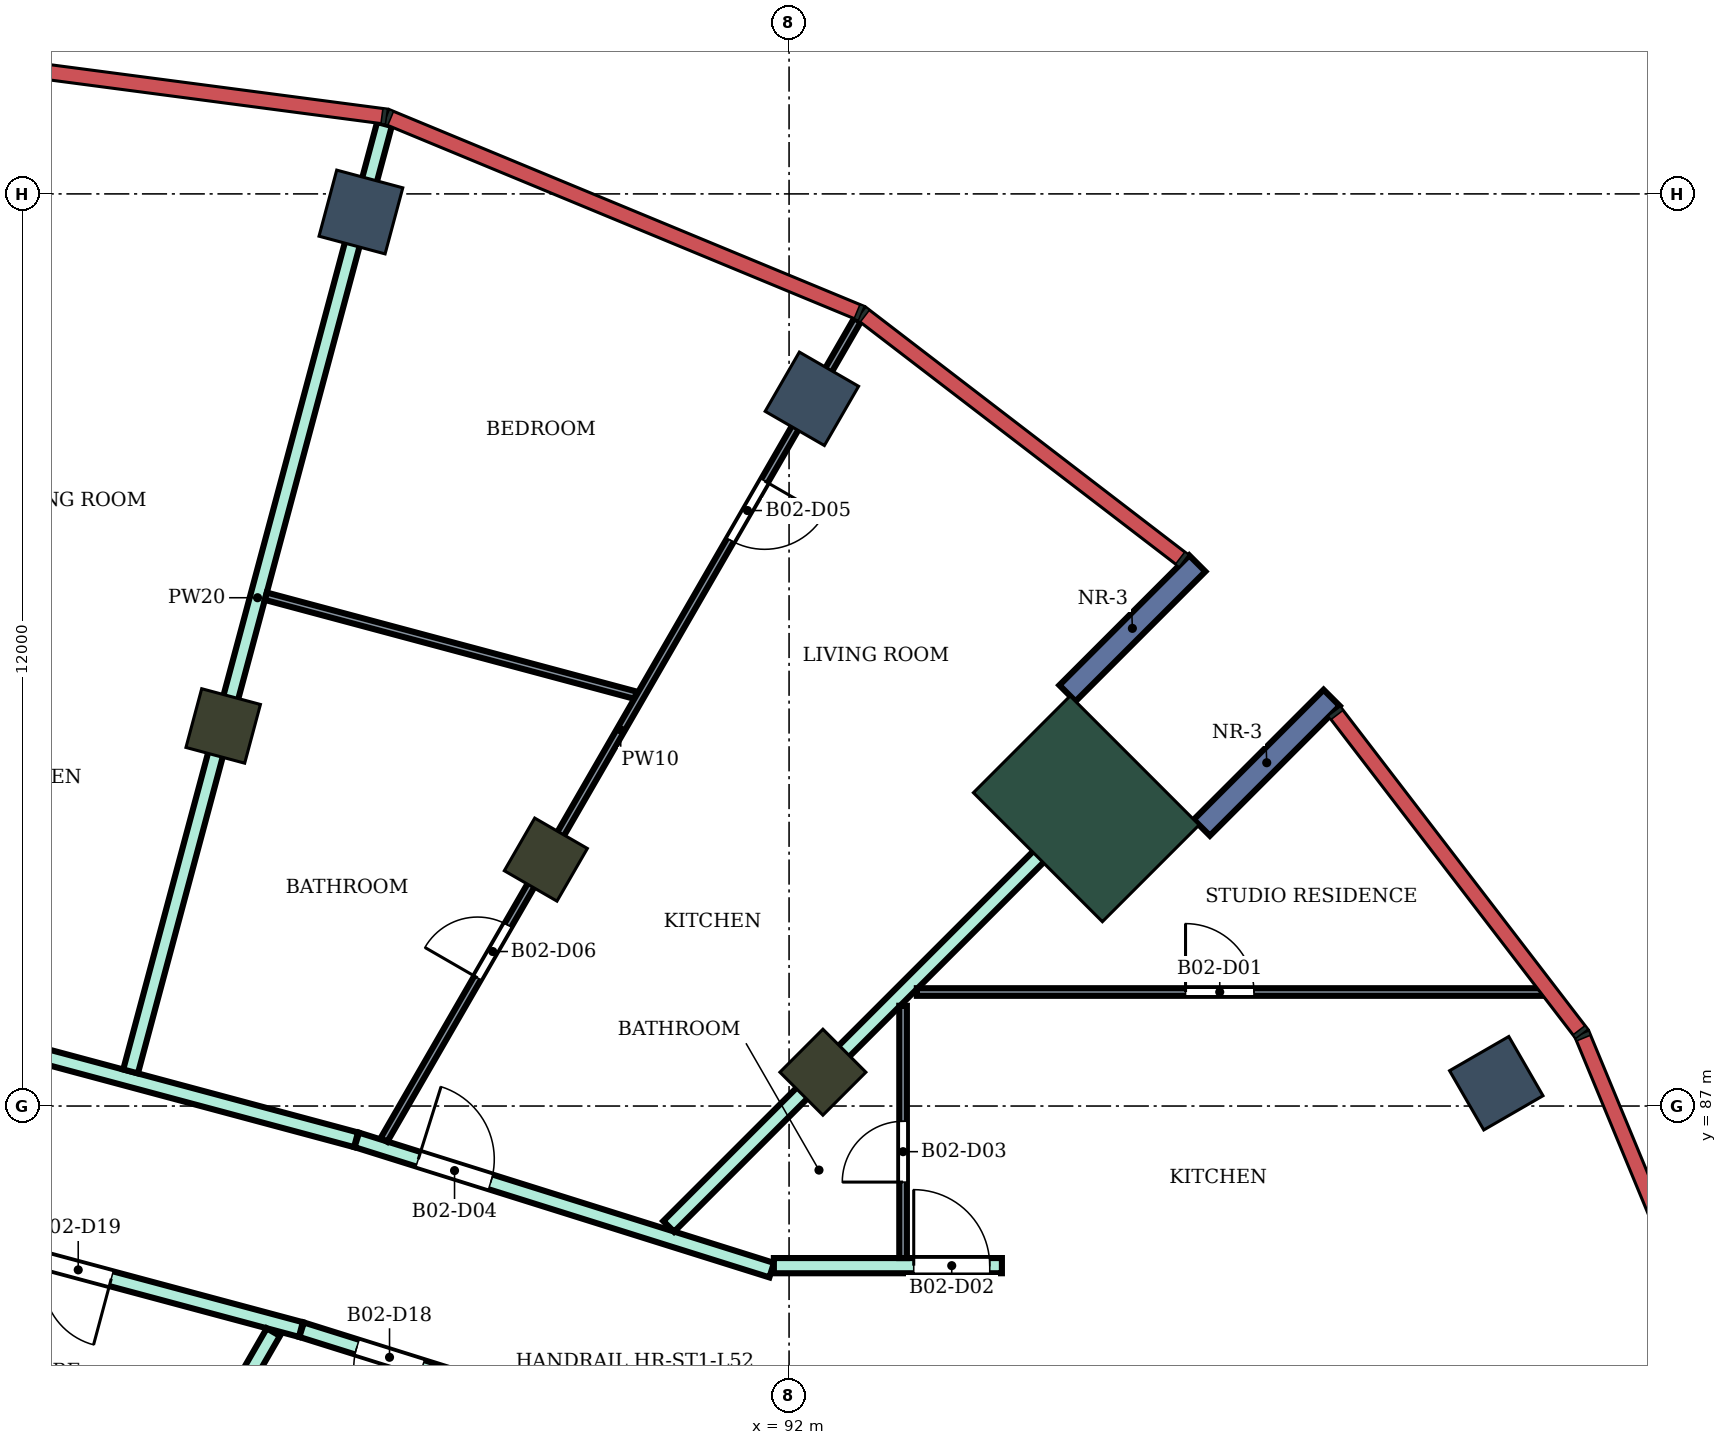
"""IFC4 building model, lengths in metres.
Left out: names, types, materials, properties, quantities, classifications, styles, units other than length and angle.
Written with IfcOpenShell. Run it as: python <this file> out.ifc"""

import sys

from ifc_helpers import new_model, si_unit, direction, frame, frame_2d, origin, origin_2d, place, context, subcontext, project, spatial, rectangle, extrude, element, fill, save


model = new_model("IFC4")
c1 = context("Model", 3, precision=1e-05, world=origin(), true_north=direction((0.0, 1.0)))
c2 = subcontext(c1, "Body", "Model", "MODEL_VIEW")
j1 = project(units=[si_unit("LENGTHUNIT", "METRE"), si_unit("PLANEANGLEUNIT", "RADIAN")], contexts=[c1])
p1 = place(None, origin())
s1 = spatial("IfcSite", under=j1, at=p1, CompositionType="ELEMENT")
p2 = place(p1, origin())
s2 = spatial("IfcBuilding", under=s1, at=p2, CompositionType="ELEMENT")
p3 = place(p2, frame((0.0, 0.0, 225.1)))
s3 = spatial("IfcBuildingStorey", under=s2, at=p3, CompositionType="ELEMENT", Elevation=225.1)
for number, where, z_axis, x_axis in (
    (1, (101.304, 87.3, 0.0), (0.0, 0.0, 1.0), (0.866, 0.5, 0.0)),
    (2, (92.3, 96.304, 0.0), (0.0, 0.0, 1.0), (0.5, 0.866, 0.0)),
    (3, (86.367, 98.762, 0.0), (0.0, 0.0, 1.0), (0.259, 0.966, 0.0)),
):
    element("IfcColumn", number, at=place(p3, frame(where, z_axis=z_axis, x_axis=x_axis)), inside=s3, PredefinedType="COLUMN", context=c2, shape_type="SweptSolid", body=[
        extrude(rectangle(XDim=0.9, YDim=0.9, at=origin_2d()), origin(), (0.0, 0.0, 1.0), 4.2),
    ])
for number, where, z_axis, x_axis in (
    (4, (92.445, 87.445, 0.0), (0.0, 0.0, 1.0), (0.707, 0.707, 0.0)),
    (5, (88.8, 90.242, 0.0), (0.0, 0.0, 1.0), (0.5, 0.866, 0.0)),
    (6, (84.555, 92.0, 0.0), (0.0, 0.0, 1.0), (0.259, 0.966, 0.0)),
):
    element("IfcColumn", number, at=place(p3, frame(where, z_axis=z_axis, x_axis=x_axis)), inside=s3, PredefinedType="COLUMN", context=c2, shape_type="SweptSolid", body=[
        extrude(rectangle(XDim=0.8, YDim=0.8, at=origin_2d()), origin(), (0.0, 0.0, 1.0), 4.2),
    ])
p4 = place(p3, frame((95.91, 90.91, 0.0), z_axis=(0.0, 0.0, 1.0), x_axis=(0.707106781187, 0.707106781187, 0.0)))
e7 = element("IfcColumn", 7, at=p4, inside=s3, PredefinedType="COLUMN", context=c2, shape_type="SweptSolid", body=[
    extrude(rectangle(XDim=1.8, YDim=2.4, at=origin_2d()), origin(), (0.0, 0.0, 1.0), 4.2),
])
for number, where, z_axis, x_axis in (
    (8, (97.43, 90.662, 0.0), (0.0, 0.0, 1.0), (0.707, 0.707, 0.0)),
    (9, (95.662, 92.43, 0.0), (0.0, 0.0, 1.0), (0.707, 0.707, 0.0)),
):
    element("IfcWall", number, at=place(p3, frame(where, z_axis=z_axis, x_axis=x_axis)), inside=s3, PredefinedType="NOTDEFINED", context=c2, shape_type="SweptSolid", body=[
        extrude(rectangle(XDim=2.416, YDim=0.3, at=frame_2d((1.208, 0.0))), origin(), (0.0, 0.0, 1.0), 4.2),
    ])
p5 = place(p3, frame((80.0, 85.554, 0.0), z_axis=(0.0, 0.0, 1.0), x_axis=(0.965928989968, -0.258807237802, 0.0)))
e10 = element("IfcWall", 10, at=p5, inside=s3, PredefinedType="PARTITIONING", context=c2, shape_type="SweptSolid", body=[
    extrude(rectangle(XDim=5.774, YDim=0.2, at=frame_2d((2.887, 0.0))), origin(), (0.0, 0.0, 1.0), 3.75),
])
p6 = place(p5, frame((2.292, 0.0, 0.0)))
e11 = element("IfcOpeningElement", 11, at=p6, cuts=e10, PredefinedType="OPENING", context=c2, shape_type="SweptSolid", body=[
    extrude(rectangle(XDim=0.9, YDim=2.1, at=frame_2d((0.45, 1.05))), frame((0.0, 0.11, 0.0), z_axis=(0.0, -1.0, 0.0), x_axis=(1.0, 0.0, 0.0)), (0.0, 0.0, 1.0), 0.22),
])
p7 = place(p3, frame((80.048, 88.233, 0.0), z_axis=(0.0, 0.0, 1.0), x_axis=(0.965865387308, -0.259044501198, 0.0)))
e12 = element("IfcWall", 12, at=p7, inside=s3, PredefinedType="PARTITIONING", context=c2, shape_type="SweptSolid", body=[
    extrude(rectangle(XDim=6.476, YDim=0.2, at=frame_2d((3.238, 0.0))), origin(), (0.0, 0.0, 1.0), 3.75),
])
p8 = place(p7, frame((0.5, 0.0, 0.0)))
e13 = element("IfcOpeningElement", 13, at=p8, cuts=e12, PredefinedType="OPENING", context=c2, shape_type="SweptSolid", body=[
    extrude(rectangle(XDim=1.0, YDim=2.1, at=frame_2d((0.5, 1.05))), frame((0.0, 0.11, 0.0), z_axis=(0.0, -1.0, 0.0), x_axis=(1.0, 0.0, 0.0)), (0.0, 0.0, 1.0), 0.22),
])
p9 = place(p3, frame((83.337, 87.455, 0.0), z_axis=(0.0, 0.0, 1.0), x_axis=(0.258878883978, 0.965909790524, 0.0)))
e14 = element("IfcWall", 14, at=p9, inside=s3, PredefinedType="PARTITIONING", context=c2, shape_type="SweptSolid", body=[
    extrude(rectangle(XDim=12.904, YDim=0.2, at=frame_2d((6.452, 0.0))), origin(), (0.0, 0.0, 1.0), 3.75),
])
p10 = place(p3, frame((83.852, 81.665, 0.0), z_axis=(0.0, 0.0, 1.0), x_axis=(0.500146274735, 0.865940935554, 0.0)))
e15 = element("IfcWall", 15, at=p10, inside=s3, PredefinedType="PARTITIONING", context=c2, shape_type="SweptSolid", body=[
    extrude(rectangle(XDim=2.726, YDim=0.2, at=frame_2d((1.363, 0.0))), origin(), (0.0, 0.0, 1.0), 3.75),
])
p11 = place(p3, frame((85.587, 84.057, 0.0), z_axis=(0.0, 0.0, 1.0), x_axis=(0.954239513179, -0.299043393987, 0.0)))
e16 = element("IfcWall", 16, at=p11, inside=s3, PredefinedType="PARTITIONING", context=c2, shape_type="SweptSolid", body=[
    extrude(rectangle(XDim=2.424, YDim=0.2, at=frame_2d((1.212, 0.0))), origin(), (0.0, 0.0, 1.0), 3.75),
])
p12 = place(p11, frame((0.762, 0.0, 0.0)))
e17 = element("IfcOpeningElement", 17, at=p12, cuts=e16, PredefinedType="OPENING", context=c2, shape_type="SweptSolid", body=[
    extrude(rectangle(XDim=0.9, YDim=2.1, at=frame_2d((0.45, 1.05))), frame((0.0, 0.11, 0.0), z_axis=(0.0, -1.0, 0.0), x_axis=(1.0, 0.0, 0.0)), (0.0, 0.0, 1.0), 0.22),
])
p13 = place(p3, frame((86.313, 86.554, 0.0), z_axis=(0.0, 0.0, 1.0), x_axis=(0.954081217458, -0.299548043717, 0.0)))
e18 = element("IfcWall", 18, at=p13, inside=s3, PredefinedType="PARTITIONING", context=c2, shape_type="SweptSolid", body=[
    extrude(rectangle(XDim=5.721, YDim=0.2, at=frame_2d((2.86, 0.0))), origin(), (0.0, 0.0, 1.0), 3.75),
])
p14 = place(p13, frame((0.848, 0.0, 0.0)))
e19 = element("IfcOpeningElement", 19, at=p14, cuts=e18, PredefinedType="OPENING", context=c2, shape_type="SweptSolid", body=[
    extrude(rectangle(XDim=1.0, YDim=2.1, at=frame_2d((0.5, 1.05))), frame((0.0, 0.11, 0.0), z_axis=(0.0, -1.0, 0.0), x_axis=(1.0, 0.0, 0.0)), (0.0, 0.0, 1.0), 0.22),
])
p15 = place(p3, frame((90.416, 85.416, 0.0), z_axis=(0.0, 0.0, 1.0), x_axis=(0.707222076599, 0.706991466971, 0.0)))
e20 = element("IfcWall", 20, at=p15, inside=s3, PredefinedType="PARTITIONING", context=c2, shape_type="SweptSolid", body=[
    extrude(rectangle(XDim=8.469, YDim=0.2, at=frame_2d((4.235, 0.0))), origin(), (0.0, 0.0, 1.0), 3.75),
])
p16 = place(p3, frame((91.8, 84.9, 0.0), z_axis=(0.0, 0.0, 1.0), x_axis=(1.0, 0.0, 0.0)))
e21 = element("IfcWall", 21, at=p16, inside=s3, PredefinedType="PARTITIONING", context=c2, shape_type="SweptSolid", body=[
    extrude(rectangle(XDim=3.0, YDim=0.2, at=frame_2d((1.5, 0.0))), origin(), (0.0, 0.0, 1.0), 3.75),
])
p17 = place(p16, frame((1.84, 0.0, 0.0)))
e22 = element("IfcOpeningElement", 22, at=p17, cuts=e21, PredefinedType="OPENING", context=c2, shape_type="SweptSolid", body=[
    extrude(rectangle(XDim=1.0, YDim=2.1, at=frame_2d((0.5, 1.05))), frame((0.0, 0.11, 0.0), z_axis=(0.0, -1.0, 0.0), x_axis=(1.0, 0.0, 0.0)), (0.0, 0.0, 1.0), 0.22),
])
p18 = place(p3, frame((85.115, 93.707, 0.0), z_axis=(0.0, 0.0, 1.0), x_axis=(0.965985898153, -0.258594749694, 0.0)))
e23 = element("IfcWall", 23, at=p18, inside=s3, PredefinedType="PARTITIONING", context=c2, shape_type="SweptSolid", body=[
    extrude(rectangle(XDim=5.037, YDim=0.1, at=frame_2d((2.519, 0.0))), origin(), (0.0, 0.0, 1.0), 3.75),
])
p19 = place(p3, frame((86.671, 86.554, 0.0), z_axis=(0.0, 0.0, 1.0), x_axis=(0.500104188531, 0.865965242151, 0.0)))
e24 = element("IfcWall", 24, at=p19, inside=s3, PredefinedType="PARTITIONING", context=c2, shape_type="SweptSolid", body=[
    extrude(rectangle(XDim=12.456, YDim=0.1, at=frame_2d((6.228, 0.0))), origin(), (0.0, 0.0, 1.0), 3.75),
])
p20 = place(p19, frame((9.111, 0.0, 0.0)))
e25 = element("IfcOpeningElement", 25, at=p20, cuts=e24, PredefinedType="OPENING", context=c2, shape_type="SweptSolid", body=[
    extrude(rectangle(XDim=0.9, YDim=2.1, at=frame_2d((0.45, 1.05))), frame((0.0, 0.06, 0.0), z_axis=(0.0, -1.0, 0.0), x_axis=(1.0, 0.0, 0.0)), (0.0, 0.0, 1.0), 0.12),
])
p21 = place(p19, frame((2.462, 0.0, 0.0)))
e26 = element("IfcOpeningElement", 26, at=p21, cuts=e24, PredefinedType="OPENING", context=c2, shape_type="SweptSolid", body=[
    extrude(rectangle(XDim=0.8, YDim=2.1, at=frame_2d((0.4, 1.05))), frame((0.0, 0.06, 0.0), z_axis=(0.0, -1.0, 0.0), x_axis=(1.0, 0.0, 0.0)), (0.0, 0.0, 1.0), 0.12),
])
p22 = place(p3, frame((93.5, 85.0, 0.0), z_axis=(0.0, 0.0, 1.0), x_axis=(0.0, 1.0, 0.0)))
e27 = element("IfcWall", 27, at=p22, inside=s3, PredefinedType="PARTITIONING", context=c2, shape_type="SweptSolid", body=[
    extrude(rectangle(XDim=3.319, YDim=0.1, at=frame_2d((1.66, 0.0))), origin(), (0.0, 0.0, 1.0), 3.75),
])
p23 = place(p22, frame((1.0, 0.0, 0.0)))
e28 = element("IfcOpeningElement", 28, at=p23, cuts=e27, PredefinedType="OPENING", context=c2, shape_type="SweptSolid", body=[
    extrude(rectangle(XDim=0.8, YDim=2.1, at=frame_2d((0.4, 1.05))), frame((0.0, 0.06, 0.0), z_axis=(0.0, -1.0, 0.0), x_axis=(1.0, 0.0, 0.0)), (0.0, 0.0, 1.0), 0.12),
])
p24 = place(p3, frame((93.681, 88.5, 0.0), z_axis=(0.0, 0.0, 1.0), x_axis=(1.0, 0.0, 0.0)))
e29 = element("IfcWall", 29, at=p24, inside=s3, PredefinedType="PARTITIONING", context=c2, shape_type="SweptSolid", body=[
    extrude(rectangle(XDim=8.247, YDim=0.1, at=frame_2d((4.124, 0.0))), origin(), (0.0, 0.0, 1.0), 3.75),
])
p25 = place(p24, frame((3.535, 0.0, 0.0)))
e30 = element("IfcOpeningElement", 30, at=p25, cuts=e29, PredefinedType="OPENING", context=c2, shape_type="SweptSolid", body=[
    extrude(rectangle(XDim=0.9, YDim=2.1, at=frame_2d((0.45, 1.05))), frame((0.0, 0.06, 0.0), z_axis=(0.0, -1.0, 0.0), x_axis=(1.0, 0.0, 0.0)), (0.0, 0.0, 1.0), 0.12),
])
p26 = place(p25, origin())
e31 = element("IfcDoor", 31, at=p26, inside=s3, OperationType="SINGLE_SWING_LEFT", PredefinedType="DOOR", context=c2, shape_type="SweptSolid", body=[
    extrude(rectangle(XDim=0.9, YDim=2.1, at=frame_2d((0.45, 1.05))), frame((0.0, 0.025, 0.0), z_axis=(0.0, -1.0, 0.0), x_axis=(1.0, 0.0, 0.0)), (0.0, 0.0, 1.0), 0.05),
])
fill(e30, e31)
p27 = place(p17, origin())
e32 = element("IfcDoor", 32, at=p27, inside=s3, OperationType="SINGLE_SWING_LEFT", PredefinedType="DOOR", context=c2, shape_type="SweptSolid", body=[
    extrude(rectangle(XDim=1.0, YDim=2.1, at=frame_2d((0.5, 1.05))), frame((0.0, 0.025, 0.0), z_axis=(0.0, -1.0, 0.0), x_axis=(1.0, 0.0, 0.0)), (0.0, 0.0, 1.0), 0.05),
])
fill(e22, e32)
p28 = place(p23, origin())
e33 = element("IfcDoor", 33, at=p28, inside=s3, OperationType="SINGLE_SWING_LEFT", PredefinedType="DOOR", context=c2, shape_type="SweptSolid", body=[
    extrude(rectangle(XDim=0.8, YDim=2.1, at=frame_2d((0.4, 1.05))), frame((0.0, 0.025, 0.0), z_axis=(0.0, -1.0, 0.0), x_axis=(1.0, 0.0, 0.0)), (0.0, 0.0, 1.0), 0.05),
])
fill(e28, e33)
p29 = place(p14, origin())
e34 = element("IfcDoor", 34, at=p29, inside=s3, OperationType="SINGLE_SWING_LEFT", PredefinedType="DOOR", context=c2, shape_type="SweptSolid", body=[
    extrude(rectangle(XDim=1.0, YDim=2.1, at=frame_2d((0.5, 1.05))), frame((0.0, 0.025, 0.0), z_axis=(0.0, -1.0, 0.0), x_axis=(1.0, 0.0, 0.0)), (0.0, 0.0, 1.0), 0.05),
])
fill(e19, e34)
p30 = place(p20, frame((0.9, 0.0, 0.0), z_axis=(0.0, 0.0, 1.0), x_axis=(-1.0, 0.0, 0.0)))
e35 = element("IfcDoor", 35, at=p30, inside=s3, OperationType="SINGLE_SWING_LEFT", PredefinedType="DOOR", context=c2, shape_type="SweptSolid", body=[
    extrude(rectangle(XDim=0.9, YDim=2.1, at=frame_2d((0.45, 1.05))), frame((0.0, 0.025, 0.0), z_axis=(0.0, -1.0, 0.0), x_axis=(1.0, 0.0, 0.0)), (0.0, 0.0, 1.0), 0.05),
])
fill(e25, e35)
p31 = place(p21, origin())
e36 = element("IfcDoor", 36, at=p31, inside=s3, OperationType="SINGLE_SWING_LEFT", PredefinedType="DOOR", context=c2, shape_type="SweptSolid", body=[
    extrude(rectangle(XDim=0.8, YDim=2.1, at=frame_2d((0.4, 1.05))), frame((0.0, 0.025, 0.0), z_axis=(0.0, -1.0, 0.0), x_axis=(1.0, 0.0, 0.0)), (0.0, 0.0, 1.0), 0.05),
])
fill(e26, e36)
p32 = place(p12, frame((0.9, 0.0, 0.0), z_axis=(0.0, 0.0, 1.0), x_axis=(-1.0, 0.0, 0.0)))
e37 = element("IfcDoor", 37, at=p32, inside=s3, OperationType="SINGLE_SWING_LEFT", PredefinedType="DOOR", context=c2, shape_type="SweptSolid", body=[
    extrude(rectangle(XDim=0.9, YDim=2.1, at=frame_2d((0.45, 1.05))), frame((0.0, 0.025, 0.0), z_axis=(0.0, -1.0, 0.0), x_axis=(1.0, 0.0, 0.0)), (0.0, 0.0, 1.0), 0.05),
])
fill(e17, e37)
p33 = place(p6, frame((0.9, 0.0, 0.0), z_axis=(0.0, 0.0, 1.0), x_axis=(-1.0, 0.0, 0.0)))
e38 = element("IfcDoor", 38, at=p33, inside=s3, OperationType="SINGLE_SWING_LEFT", PredefinedType="DOOR", context=c2, shape_type="SweptSolid", body=[
    extrude(rectangle(XDim=0.9, YDim=2.1, at=frame_2d((0.45, 1.05))), frame((0.0, 0.025, 0.0), z_axis=(0.0, -1.0, 0.0), x_axis=(1.0, 0.0, 0.0)), (0.0, 0.0, 1.0), 0.05),
])
fill(e11, e38)
save(model, sys.argv[1])
